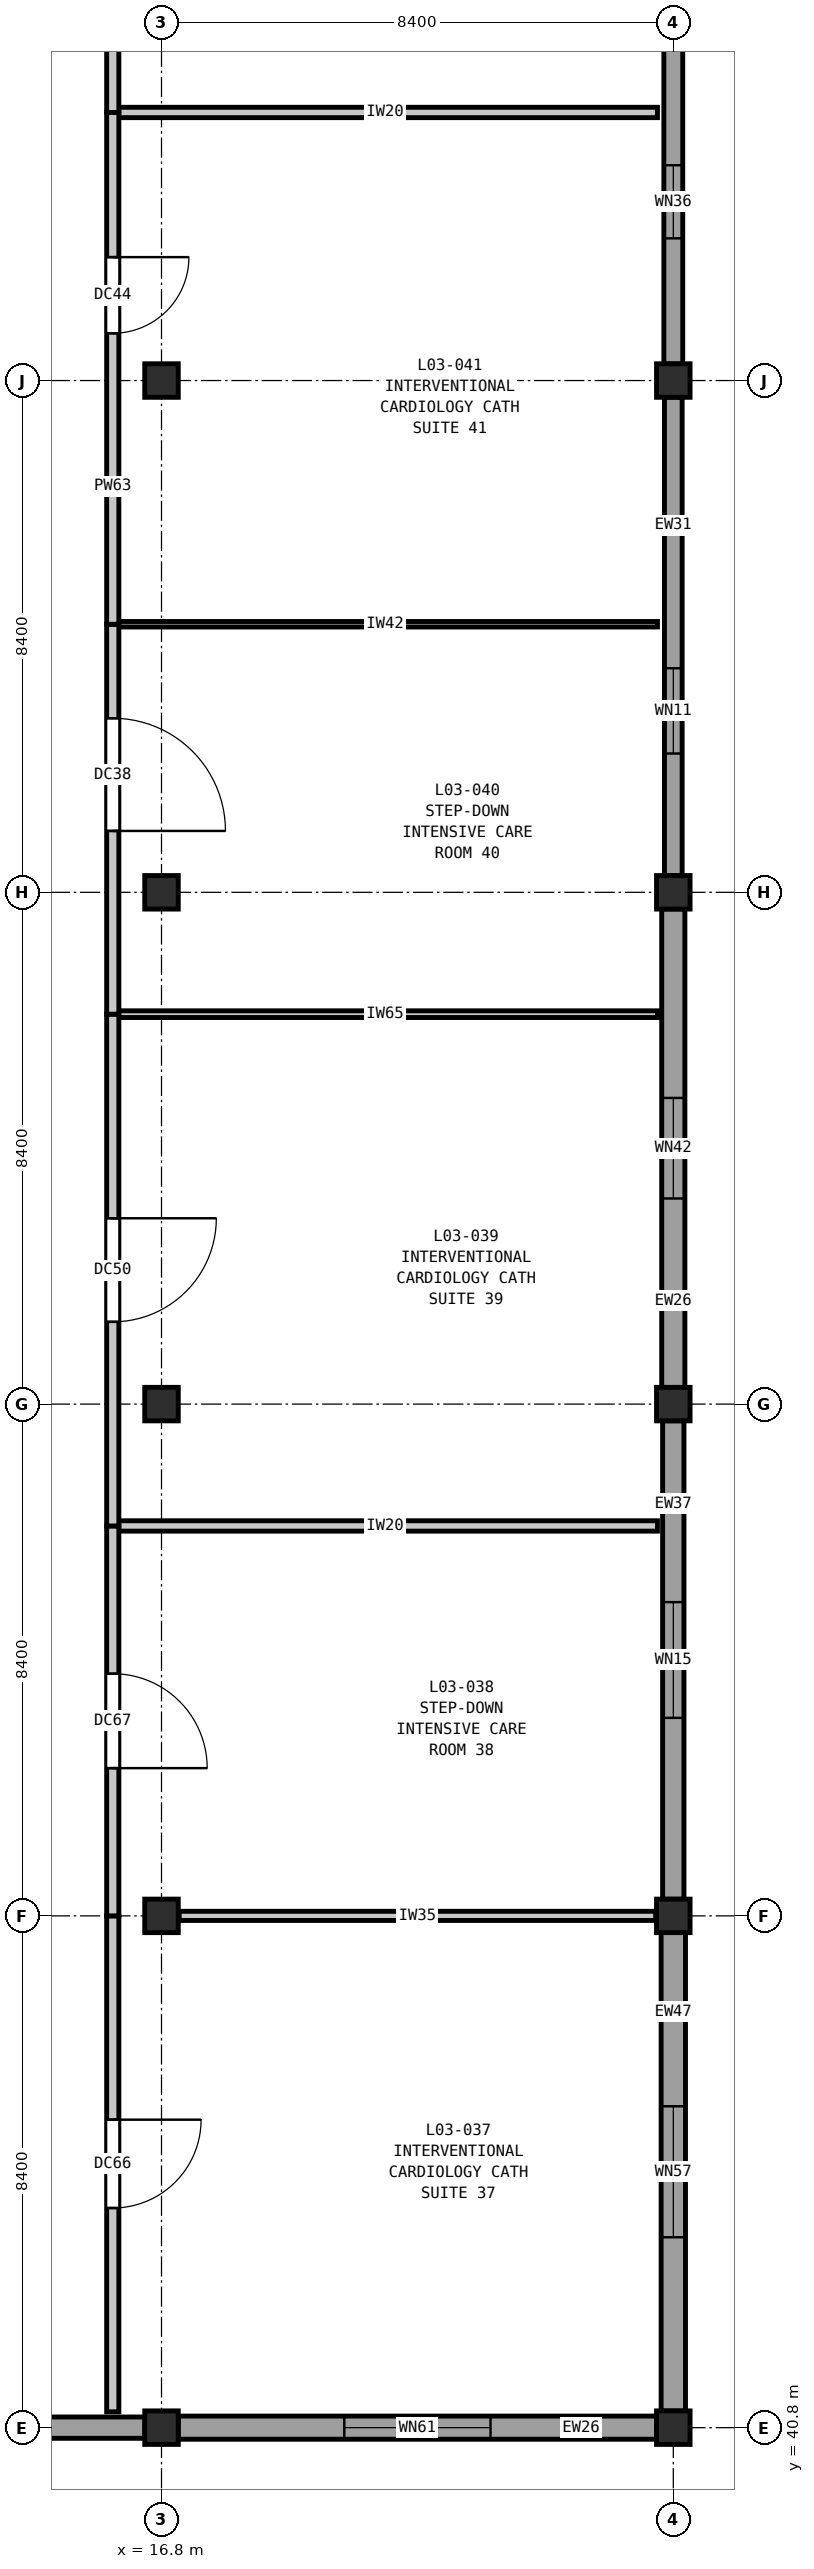
"""IFC4 building model, lengths in metres.
Left out: names, types, materials, properties, quantities, classifications, styles, units other than length and angle.
Written with IfcOpenShell. Run it as: python <this file> out.ifc"""

import sys

from ifc_helpers import new_model, si_unit, direction, frame, frame_2d, origin, origin_2d, place, context, subcontext, project, spatial, rectangle, extrude, element, fill, save


model = new_model("IFC4")
c1 = context("Model", 3, precision=1e-05, world=origin(), true_north=direction((0.0, 1.0)))
c2 = subcontext(c1, "Body", "Model", "MODEL_VIEW")
j1 = project(units=[si_unit("LENGTHUNIT", "METRE"), si_unit("PLANEANGLEUNIT", "RADIAN")], contexts=[c1])
p1 = place(None, origin())
s1 = spatial("IfcSite", under=j1, at=p1, CompositionType="ELEMENT")
p2 = place(p1, origin())
s2 = spatial("IfcBuilding", under=s1, at=p2, CompositionType="ELEMENT")
p3 = place(p2, frame((0.0, 0.0, 16.2)))
s3 = spatial("IfcBuildingStorey", under=s2, at=p3, CompositionType="ELEMENT", Elevation=16.2)
for number, where, z_axis, x_axis in (
    (1, (16.8, 40.8, 0.0), (0.0, 0.0, 1.0), (1.0, 0.0, 0.0)),
    (2, (16.8, 49.2, 0.0), (0.0, 0.0, 1.0), (1.0, 0.0, 0.0)),
    (3, (16.8, 57.6, 0.0), (0.0, 0.0, 1.0), (1.0, 0.0, 0.0)),
    (4, (16.8, 66.0, 0.0), (0.0, 0.0, 1.0), (1.0, 0.0, 0.0)),
    (5, (16.8, 74.4, 0.0), (0.0, 0.0, 1.0), (1.0, 0.0, 0.0)),
    (6, (25.2, 40.8, 0.0), (0.0, 0.0, 1.0), (1.0, 0.0, 0.0)),
    (7, (25.2, 49.2, 0.0), (0.0, 0.0, 1.0), (1.0, 0.0, 0.0)),
    (8, (25.2, 57.6, 0.0), (0.0, 0.0, 1.0), (1.0, 0.0, 0.0)),
    (9, (25.2, 66.0, 0.0), (0.0, 0.0, 1.0), (1.0, 0.0, 0.0)),
    (10, (25.2, 74.4, 0.0), (0.0, 0.0, 1.0), (1.0, 0.0, 0.0)),
):
    element("IfcColumn", number, at=place(p3, frame(where, z_axis=z_axis, x_axis=x_axis)), inside=s3, PredefinedType="COLUMN", context=c2, shape_type="SweptSolid", body=[
        extrude(rectangle(XDim=0.55, YDim=0.55, at=origin_2d()), origin(), (0.0, 0.0, 1.0), 4.2),
    ])
p4 = place(p3, frame((25.2, 82.527, 0.0), z_axis=(0.0, 0.0, 1.0), x_axis=(0.0, -1.0, 0.0)))
e11 = element("IfcWall", 11, at=p4, inside=s3, PredefinedType="SOLIDWALL", context=c2, shape_type="SweptSolid", body=[
    extrude(rectangle(XDim=7.854, YDim=0.31, at=frame_2d((3.927, 0.0))), origin(), (0.0, 0.0, 1.0), 3.48),
])
p5 = place(p4, frame((4.593, 0.0, 0.9)))
e12 = element("IfcOpeningElement", 12, at=p5, cuts=e11, PredefinedType="OPENING", context=c2, shape_type="SweptSolid", body=[
    extrude(rectangle(XDim=1.2, YDim=2.15, at=frame_2d((0.6, 1.075))), frame((0.0, 0.165, 0.0), z_axis=(0.0, -1.0, 0.0), x_axis=(1.0, 0.0, 0.0)), (0.0, 0.0, 1.0), 0.33),
])
p6 = place(p3, frame((25.2, 74.127, 0.0), z_axis=(0.0, 0.0, 1.0), x_axis=(0.0, -1.0, 0.0)))
e13 = element("IfcWall", 13, at=p6, inside=s3, PredefinedType="SOLIDWALL", context=c2, shape_type="SweptSolid", body=[
    extrude(rectangle(XDim=7.854, YDim=0.29, at=frame_2d((3.927, 0.0))), origin(), (0.0, 0.0, 1.0), 3.48),
])
p7 = place(p6, frame((4.449, 0.0, 0.9)))
e14 = element("IfcOpeningElement", 14, at=p7, cuts=e13, PredefinedType="OPENING", context=c2, shape_type="SweptSolid", body=[
    extrude(rectangle(XDim=1.4, YDim=2.15, at=frame_2d((0.7, 1.075))), frame((0.0, 0.155, 0.0), z_axis=(0.0, -1.0, 0.0), x_axis=(1.0, 0.0, 0.0)), (0.0, 0.0, 1.0), 0.31),
])
p8 = place(p3, frame((25.2, 65.727, 0.0), z_axis=(0.0, 0.0, 1.0), x_axis=(0.0, -1.0, 0.0)))
e15 = element("IfcWall", 15, at=p8, inside=s3, PredefinedType="SOLIDWALL", context=c2, shape_type="SweptSolid", body=[
    extrude(rectangle(XDim=7.854, YDim=0.38, at=frame_2d((3.927, 0.0))), origin(), (0.0, 0.0, 1.0), 3.48),
])
p9 = place(p8, frame((3.102, 0.0, 0.9)))
e16 = element("IfcOpeningElement", 16, at=p9, cuts=e15, PredefinedType="OPENING", context=c2, shape_type="SweptSolid", body=[
    extrude(rectangle(XDim=1.65, YDim=2.15, at=frame_2d((0.825, 1.075))), frame((0.0, 0.2, 0.0), z_axis=(0.0, -1.0, 0.0), x_axis=(1.0, 0.0, 0.0)), (0.0, 0.0, 1.0), 0.4),
])
p10 = place(p3, frame((25.2, 57.327, 0.0), z_axis=(0.0, 0.0, 1.0), x_axis=(0.0, -1.0, 0.0)))
e17 = element("IfcWall", 17, at=p10, inside=s3, PredefinedType="SOLIDWALL", context=c2, shape_type="SweptSolid", body=[
    extrude(rectangle(XDim=7.854, YDim=0.35, at=frame_2d((3.927, 0.0))), origin(), (0.0, 0.0, 1.0), 3.48),
])
p11 = place(p10, frame((2.977, 0.0, 0.9)))
e18 = element("IfcOpeningElement", 18, at=p11, cuts=e17, PredefinedType="OPENING", context=c2, shape_type="SweptSolid", body=[
    extrude(rectangle(XDim=1.9, YDim=2.15, at=frame_2d((0.95, 1.075))), frame((0.0, 0.185, 0.0), z_axis=(0.0, -1.0, 0.0), x_axis=(1.0, 0.0, 0.0)), (0.0, 0.0, 1.0), 0.37),
])
p12 = place(p3, frame((25.2, 48.927, 0.0), z_axis=(0.0, 0.0, 1.0), x_axis=(0.0, -1.0, 0.0)))
e19 = element("IfcWall", 19, at=p12, inside=s3, PredefinedType="SOLIDWALL", context=c2, shape_type="SweptSolid", body=[
    extrude(rectangle(XDim=7.854, YDim=0.4, at=frame_2d((3.927, 0.0))), origin(), (0.0, 0.0, 1.0), 3.48),
])
p13 = place(p12, frame((2.852, 0.0, 0.9)))
e20 = element("IfcOpeningElement", 20, at=p13, cuts=e19, PredefinedType="OPENING", context=c2, shape_type="SweptSolid", body=[
    extrude(rectangle(XDim=2.15, YDim=2.15, at=frame_2d((1.075, 1.075))), frame((0.0, 0.21, 0.0), z_axis=(0.0, -1.0, 0.0), x_axis=(1.0, 0.0, 0.0)), (0.0, 0.0, 1.0), 0.42),
])
p14 = place(p3, frame((24.927, 40.8, 0.0), z_axis=(0.0, 0.0, 1.0), x_axis=(-1.0, 0.0, 0.0)))
e21 = element("IfcWall", 21, at=p14, inside=s3, PredefinedType="SOLIDWALL", context=c2, shape_type="SweptSolid", body=[
    extrude(rectangle(XDim=7.854, YDim=0.38, at=frame_2d((3.927, 0.0))), origin(), (0.0, 0.0, 1.0), 3.48),
])
p15 = place(p14, frame((2.727, 0.0, 0.9)))
e22 = element("IfcOpeningElement", 22, at=p15, cuts=e21, PredefinedType="OPENING", context=c2, shape_type="SweptSolid", body=[
    extrude(rectangle(XDim=2.4, YDim=2.15, at=frame_2d((1.2, 1.075))), frame((0.0, 0.2, 0.0), z_axis=(0.0, -1.0, 0.0), x_axis=(1.0, 0.0, 0.0)), (0.0, 0.0, 1.0), 0.4),
])
p16 = place(p3, frame((16.527, 40.8, 0.0), z_axis=(0.0, 0.0, 1.0), x_axis=(-1.0, 0.0, 0.0)))
e23 = element("IfcWall", 23, at=p16, inside=s3, PredefinedType="SOLIDWALL", context=c2, shape_type="SweptSolid", body=[
    extrude(rectangle(XDim=7.854, YDim=0.35, at=frame_2d((3.927, 0.0))), origin(), (0.0, 0.0, 1.0), 3.48),
])
p17 = place(p3, frame((17.09, 49.2, 0.0), z_axis=(0.0, 0.0, 1.0), x_axis=(1.0, 0.0, 0.0)))
e24 = element("IfcWall", 24, at=p17, inside=s3, PredefinedType="PARTITIONING", context=c2, shape_type="SweptSolid", body=[
    extrude(rectangle(XDim=7.82, YDim=0.15, at=frame_2d((3.91, 0.0))), origin(), (0.0, 0.0, 1.0), 3.535),
])
p18 = place(p3, frame((16.0, 55.6, 0.0), z_axis=(0.0, 0.0, 1.0), x_axis=(1.0, 0.0, 0.0)))
e25 = element("IfcWall", 25, at=p18, inside=s3, PredefinedType="PARTITIONING", context=c2, shape_type="SweptSolid", body=[
    extrude(rectangle(XDim=8.94, YDim=0.17, at=frame_2d((4.47, 0.0))), origin(), (0.0, 0.0, 1.0), 3.89),
])
p19 = place(p3, frame((16.0, 64.0, 0.0), z_axis=(0.0, 0.0, 1.0), x_axis=(1.0, 0.0, 0.0)))
e26 = element("IfcWall", 26, at=p19, inside=s3, PredefinedType="PARTITIONING", context=c2, shape_type="SweptSolid", body=[
    extrude(rectangle(XDim=8.94, YDim=0.11, at=frame_2d((4.47, 0.0))), origin(), (0.0, 0.0, 1.0), 3.89),
])
p20 = place(p3, frame((16.0, 70.4, 0.0), z_axis=(0.0, 0.0, 1.0), x_axis=(1.0, 0.0, 0.0)))
e27 = element("IfcWall", 27, at=p20, inside=s3, PredefinedType="PARTITIONING", context=c2, shape_type="SweptSolid", body=[
    extrude(rectangle(XDim=8.94, YDim=0.09, at=frame_2d((4.47, 0.0))), origin(), (0.0, 0.0, 1.0), 3.89),
])
p21 = place(p3, frame((16.0, 78.8, 0.0), z_axis=(0.0, 0.0, 1.0), x_axis=(1.0, 0.0, 0.0)))
e28 = element("IfcWall", 28, at=p21, inside=s3, PredefinedType="PARTITIONING", context=c2, shape_type="SweptSolid", body=[
    extrude(rectangle(XDim=8.94, YDim=0.17, at=frame_2d((4.47, 0.0))), origin(), (0.0, 0.0, 1.0), 3.89),
])
p22 = place(p3, frame((16.0, 41.06, 0.0), z_axis=(0.0, 0.0, 1.0), x_axis=(0.0, 1.0, 0.0)))
e29 = element("IfcWall", 29, at=p22, inside=s3, PredefinedType="PARTITIONING", context=c2, shape_type="SweptSolid", body=[
    extrude(rectangle(XDim=8.14, YDim=0.2, at=frame_2d((4.07, 0.0))), origin(), (0.0, 0.0, 1.0), 3.89),
])
p23 = place(p22, frame((3.345, 0.0, 0.0)))
e30 = element("IfcOpeningElement", 30, at=p23, cuts=e29, PredefinedType="OPENING", context=c2, shape_type="SweptSolid", body=[
    extrude(rectangle(XDim=1.45, YDim=2.25, at=frame_2d((0.725, 1.125))), frame((0.0, 0.11, 0.0), z_axis=(0.0, -1.0, 0.0), x_axis=(1.0, 0.0, 0.0)), (0.0, 0.0, 1.0), 0.22),
])
p24 = place(p3, frame((16.0, 49.2, 0.0), z_axis=(0.0, 0.0, 1.0), x_axis=(0.0, 1.0, 0.0)))
e31 = element("IfcWall", 31, at=p24, inside=s3, PredefinedType="PARTITIONING", context=c2, shape_type="SweptSolid", body=[
    extrude(rectangle(XDim=6.4, YDim=0.2, at=frame_2d((3.2, 0.0))), origin(), (0.0, 0.0, 1.0), 3.89),
])
p25 = place(p24, frame((2.425, 0.0, 0.0)))
e32 = element("IfcOpeningElement", 32, at=p25, cuts=e31, PredefinedType="OPENING", context=c2, shape_type="SweptSolid", body=[
    extrude(rectangle(XDim=1.55, YDim=2.25, at=frame_2d((0.775, 1.125))), frame((0.0, 0.11, 0.0), z_axis=(0.0, -1.0, 0.0), x_axis=(1.0, 0.0, 0.0)), (0.0, 0.0, 1.0), 0.22),
])
p26 = place(p3, frame((16.0, 55.6, 0.0), z_axis=(0.0, 0.0, 1.0), x_axis=(0.0, 1.0, 0.0)))
e33 = element("IfcWall", 33, at=p26, inside=s3, PredefinedType="PARTITIONING", context=c2, shape_type="SweptSolid", body=[
    extrude(rectangle(XDim=8.4, YDim=0.2, at=frame_2d((4.2, 0.0))), origin(), (0.0, 0.0, 1.0), 3.89),
])
p27 = place(p26, frame((3.35, 0.0, 0.0)))
e34 = element("IfcOpeningElement", 34, at=p27, cuts=e33, PredefinedType="OPENING", context=c2, shape_type="SweptSolid", body=[
    extrude(rectangle(XDim=1.7, YDim=2.3, at=frame_2d((0.85, 1.15))), frame((0.0, 0.11, 0.0), z_axis=(0.0, -1.0, 0.0), x_axis=(1.0, 0.0, 0.0)), (0.0, 0.0, 1.0), 0.22),
])
p28 = place(p3, frame((16.0, 64.0, 0.0), z_axis=(0.0, 0.0, 1.0), x_axis=(0.0, 1.0, 0.0)))
e35 = element("IfcWall", 35, at=p28, inside=s3, PredefinedType="PARTITIONING", context=c2, shape_type="SweptSolid", body=[
    extrude(rectangle(XDim=6.4, YDim=0.2, at=frame_2d((3.2, 0.0))), origin(), (0.0, 0.0, 1.0), 3.89),
])
p29 = place(p28, frame((3.008, 0.0, 0.0)))
e36 = element("IfcOpeningElement", 36, at=p29, cuts=e35, PredefinedType="OPENING", context=c2, shape_type="SweptSolid", body=[
    extrude(rectangle(XDim=1.85, YDim=2.3, at=frame_2d((0.925, 1.15))), frame((0.0, 0.11, 0.0), z_axis=(0.0, -1.0, 0.0), x_axis=(1.0, 0.0, 0.0)), (0.0, 0.0, 1.0), 0.22),
])
p30 = place(p3, frame((16.0, 70.4, 0.0), z_axis=(0.0, 0.0, 1.0), x_axis=(0.0, 1.0, 0.0)))
e37 = element("IfcWall", 37, at=p30, inside=s3, PredefinedType="PARTITIONING", context=c2, shape_type="SweptSolid", body=[
    extrude(rectangle(XDim=8.4, YDim=0.2, at=frame_2d((4.2, 0.0))), origin(), (0.0, 0.0, 1.0), 3.89),
])
p31 = place(p30, frame((4.776, 0.0, 0.0)))
e38 = element("IfcOpeningElement", 38, at=p31, cuts=e37, PredefinedType="OPENING", context=c2, shape_type="SweptSolid", body=[
    extrude(rectangle(XDim=1.25, YDim=2.15, at=frame_2d((0.625, 1.075))), frame((0.0, 0.11, 0.0), z_axis=(0.0, -1.0, 0.0), x_axis=(1.0, 0.0, 0.0)), (0.0, 0.0, 1.0), 0.22),
])
p32 = place(p3, frame((16.0, 78.8, 0.0), z_axis=(0.0, 0.0, 1.0), x_axis=(0.0, 1.0, 0.0)))
e39 = element("IfcWall", 39, at=p32, inside=s3, PredefinedType="PARTITIONING", context=c2, shape_type="SweptSolid", body=[
    extrude(rectangle(XDim=4.0, YDim=0.2, at=frame_2d((2.0, 0.0))), origin(), (0.0, 0.0, 1.0), 3.89),
])
p33 = place(p32, frame((1.35, 0.0, 0.0)))
e40 = element("IfcOpeningElement", 40, at=p33, cuts=e39, PredefinedType="OPENING", context=c2, shape_type="SweptSolid", body=[
    extrude(rectangle(XDim=1.3, YDim=2.2, at=frame_2d((0.65, 1.1))), frame((0.0, 0.11, 0.0), z_axis=(0.0, -1.0, 0.0), x_axis=(1.0, 0.0, 0.0)), (0.0, 0.0, 1.0), 0.22),
])
p34 = place(p5, origin())
e41 = element("IfcWindow", 41, at=p34, inside=s3, PartitioningType="SINGLE_PANEL", PredefinedType="WINDOW", context=c2, shape_type="SweptSolid", body=[
    extrude(rectangle(XDim=1.2, YDim=2.15, at=frame_2d((0.6, 1.075))), frame((0.0, 0.03, 0.0), z_axis=(0.0, -1.0, 0.0), x_axis=(1.0, 0.0, 0.0)), (0.0, 0.0, 1.0), 0.06),
])
fill(e12, e41)
p35 = place(p7, origin())
e42 = element("IfcWindow", 42, at=p35, inside=s3, PartitioningType="SINGLE_PANEL", PredefinedType="WINDOW", context=c2, shape_type="SweptSolid", body=[
    extrude(rectangle(XDim=1.4, YDim=2.15, at=frame_2d((0.7, 1.075))), frame((0.0, 0.03, 0.0), z_axis=(0.0, -1.0, 0.0), x_axis=(1.0, 0.0, 0.0)), (0.0, 0.0, 1.0), 0.06),
])
fill(e14, e42)
p36 = place(p9, origin())
e43 = element("IfcWindow", 43, at=p36, inside=s3, PartitioningType="DOUBLE_PANEL_VERTICAL", PredefinedType="WINDOW", context=c2, shape_type="SweptSolid", body=[
    extrude(rectangle(XDim=1.65, YDim=2.15, at=frame_2d((0.825, 1.075))), frame((0.0, 0.03, 0.0), z_axis=(0.0, -1.0, 0.0), x_axis=(1.0, 0.0, 0.0)), (0.0, 0.0, 1.0), 0.06),
])
fill(e16, e43)
p37 = place(p11, origin())
e44 = element("IfcWindow", 44, at=p37, inside=s3, PartitioningType="DOUBLE_PANEL_VERTICAL", PredefinedType="WINDOW", context=c2, shape_type="SweptSolid", body=[
    extrude(rectangle(XDim=1.9, YDim=2.15, at=frame_2d((0.95, 1.075))), frame((0.0, 0.03, 0.0), z_axis=(0.0, -1.0, 0.0), x_axis=(1.0, 0.0, 0.0)), (0.0, 0.0, 1.0), 0.06),
])
fill(e18, e44)
p38 = place(p13, origin())
e45 = element("IfcWindow", 45, at=p38, inside=s3, PartitioningType="DOUBLE_PANEL_VERTICAL", PredefinedType="WINDOW", context=c2, shape_type="SweptSolid", body=[
    extrude(rectangle(XDim=2.15, YDim=2.15, at=frame_2d((1.075, 1.075))), frame((0.0, 0.03, 0.0), z_axis=(0.0, -1.0, 0.0), x_axis=(1.0, 0.0, 0.0)), (0.0, 0.0, 1.0), 0.06),
])
fill(e20, e45)
p39 = place(p15, origin())
e46 = element("IfcWindow", 46, at=p39, inside=s3, PartitioningType="DOUBLE_PANEL_VERTICAL", PredefinedType="WINDOW", context=c2, shape_type="SweptSolid", body=[
    extrude(rectangle(XDim=2.4, YDim=2.15, at=frame_2d((1.2, 1.075))), frame((0.0, 0.03, 0.0), z_axis=(0.0, -1.0, 0.0), x_axis=(1.0, 0.0, 0.0)), (0.0, 0.0, 1.0), 0.06),
])
fill(e22, e46)
p40 = place(p23, frame((1.45, 0.0, 0.0), z_axis=(0.0, 0.0, 1.0), x_axis=(-1.0, 0.0, 0.0)))
e47 = element("IfcDoor", 47, at=p40, inside=s3, OperationType="SINGLE_SWING_LEFT", PredefinedType="DOOR", context=c2, shape_type="SweptSolid", body=[
    extrude(rectangle(XDim=1.45, YDim=2.25, at=frame_2d((0.725, 1.125))), frame((0.0, 0.025, 0.0), z_axis=(0.0, -1.0, 0.0), x_axis=(1.0, 0.0, 0.0)), (0.0, 0.0, 1.0), 0.05),
])
fill(e30, e47)
p41 = place(p25, frame((1.55, 0.0, 0.0), z_axis=(0.0, 0.0, 1.0), x_axis=(-1.0, 0.0, 0.0)))
e48 = element("IfcDoor", 48, at=p41, inside=s3, OperationType="SINGLE_SWING_RIGHT", PredefinedType="DOOR", context=c2, shape_type="SweptSolid", body=[
    extrude(rectangle(XDim=1.55, YDim=2.25, at=frame_2d((0.775, 1.125))), frame((0.0, 0.025, 0.0), z_axis=(0.0, -1.0, 0.0), x_axis=(1.0, 0.0, 0.0)), (0.0, 0.0, 1.0), 0.05),
])
fill(e32, e48)
p42 = place(p27, frame((1.7, 0.0, 0.0), z_axis=(0.0, 0.0, 1.0), x_axis=(-1.0, 0.0, 0.0)))
e49 = element("IfcDoor", 49, at=p42, inside=s3, OperationType="SINGLE_SWING_LEFT", PredefinedType="DOOR", context=c2, shape_type="SweptSolid", body=[
    extrude(rectangle(XDim=1.7, YDim=2.3, at=frame_2d((0.85, 1.15))), frame((0.0, 0.025, 0.0), z_axis=(0.0, -1.0, 0.0), x_axis=(1.0, 0.0, 0.0)), (0.0, 0.0, 1.0), 0.05),
])
fill(e34, e49)
p43 = place(p29, frame((1.85, 0.0, 0.0), z_axis=(0.0, 0.0, 1.0), x_axis=(-1.0, 0.0, 0.0)))
e50 = element("IfcDoor", 50, at=p43, inside=s3, OperationType="SINGLE_SWING_RIGHT", PredefinedType="DOOR", context=c2, shape_type="SweptSolid", body=[
    extrude(rectangle(XDim=1.85, YDim=2.3, at=frame_2d((0.925, 1.15))), frame((0.0, 0.025, 0.0), z_axis=(0.0, -1.0, 0.0), x_axis=(1.0, 0.0, 0.0)), (0.0, 0.0, 1.0), 0.05),
])
fill(e36, e50)
p44 = place(p31, frame((1.25, 0.0, 0.0), z_axis=(0.0, 0.0, 1.0), x_axis=(-1.0, 0.0, 0.0)))
e51 = element("IfcDoor", 51, at=p44, inside=s3, OperationType="SINGLE_SWING_LEFT", PredefinedType="DOOR", context=c2, shape_type="SweptSolid", body=[
    extrude(rectangle(XDim=1.25, YDim=2.15, at=frame_2d((0.625, 1.075))), frame((0.0, 0.025, 0.0), z_axis=(0.0, -1.0, 0.0), x_axis=(1.0, 0.0, 0.0)), (0.0, 0.0, 1.0), 0.05),
])
fill(e38, e51)
save(model, sys.argv[1])
